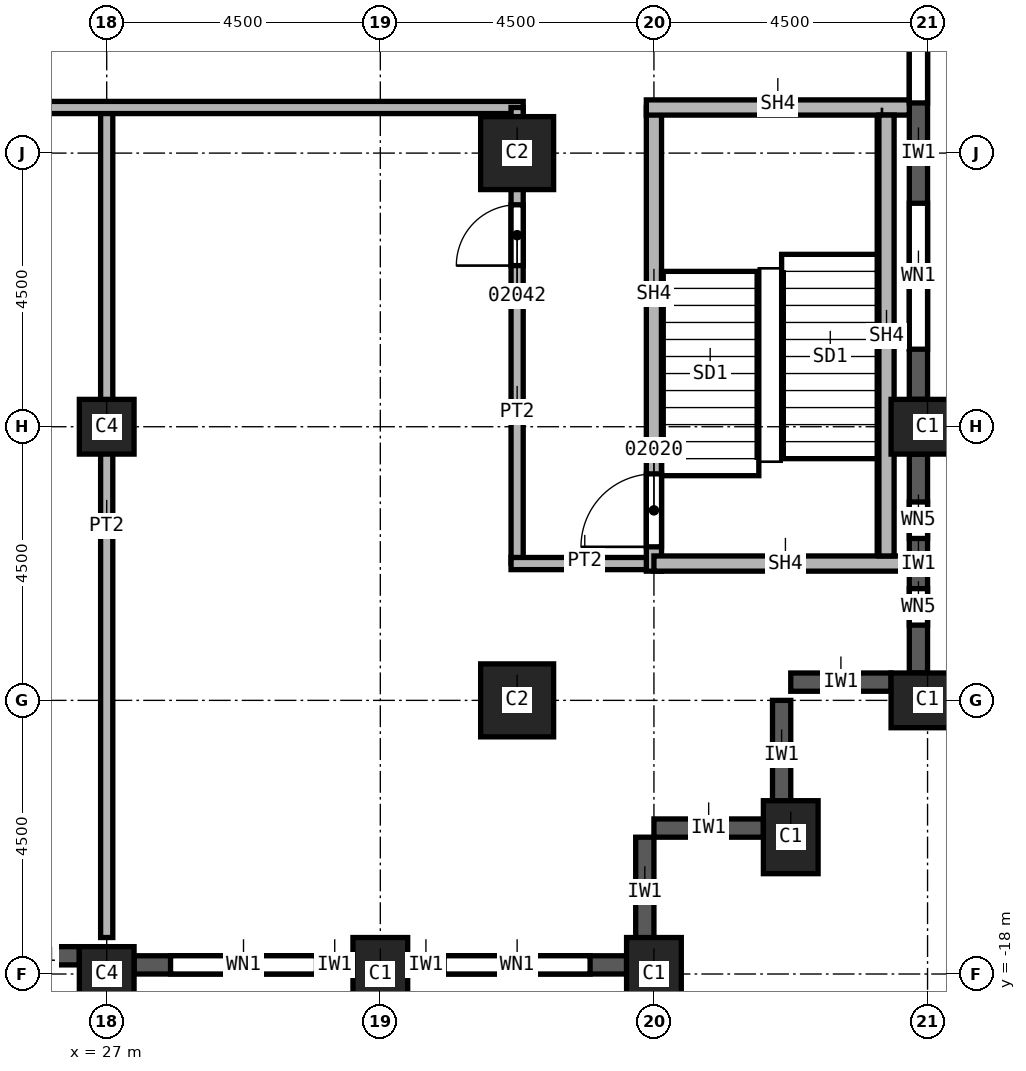
"""IFC4 building model, lengths in metres.
Left out: names, types, materials, properties, quantities, classifications, styles, units other than length and angle.
Written with IfcOpenShell. Run it as: python <this file> out.ifc"""

import sys

from ifc_helpers import new_model, si_unit, direction, frame, frame_2d, origin, origin_2d, place, context, subcontext, project, spatial, rectangle, extrude, element, fill, save


model = new_model("IFC4")
c1 = context("Model", 3, precision=1e-05, world=origin(), true_north=direction((0.0, 1.0)))
c2 = subcontext(c1, "Body", "Model", "MODEL_VIEW")
j1 = project(units=[si_unit("LENGTHUNIT", "METRE"), si_unit("PLANEANGLEUNIT", "RADIAN")], contexts=[c1])
p1 = place(None, origin())
s1 = spatial("IfcSite", under=j1, at=p1, CompositionType="ELEMENT")
p2 = place(p1, origin())
s2 = spatial("IfcBuilding", under=s1, at=p2, CompositionType="ELEMENT")
p3 = place(p2, frame((0.0, 0.0, 80.0)))
s3 = spatial("IfcBuildingStorey", under=s2, at=p3, CompositionType="ELEMENT", Elevation=80.0)
for number, where, z_axis, x_axis in (
    (1, (40.5, -9.0, 0.0), (0.0, 0.0, 1.0), (0.0, 1.0, 0.0)),
    (2, (40.5, -13.5, 0.0), (0.0, 0.0, 1.0), (0.0, 1.0, 0.0)),
    (3, (38.25, -15.75, 0.0), (0.0, 0.0, 1.0), (1.0, 0.0, 0.0)),
    (4, (31.5, -18.0, 0.0), (0.0, 0.0, 1.0), (1.0, 0.0, 0.0)),
    (5, (36.0, -18.0, 0.0), (0.0, 0.0, 1.0), (1.0, 0.0, 0.0)),
):
    element("IfcColumn", number, at=place(p3, frame(where, z_axis=z_axis, x_axis=x_axis)), inside=s3, PredefinedType="COLUMN", context=c2, shape_type="SweptSolid", body=[
        extrude(rectangle(XDim=0.9, YDim=1.2, at=origin_2d()), origin(), (0.0, 0.0, 1.0), 3.7),
    ])
for number, where, z_axis, x_axis in (
    (6, (33.75, -4.5, 0.0), (0.0, 0.0, 1.0), (1.0, 0.0, 0.0)),
    (7, (33.75, -13.5, 0.0), (0.0, 0.0, 1.0), (1.0, 0.0, 0.0)),
):
    element("IfcColumn", number, at=place(p3, frame(where, z_axis=z_axis, x_axis=x_axis)), inside=s3, PredefinedType="COLUMN", context=c2, shape_type="SweptSolid", body=[
        extrude(rectangle(XDim=1.2, YDim=1.2, at=origin_2d()), origin(), (0.0, 0.0, 1.0), 3.7),
    ])
for number, where, z_axis, x_axis in (
    (8, (27.0, -9.0, 0.0), (0.0, 0.0, 1.0), (1.0, 0.0, 0.0)),
    (9, (27.0, -18.0, 0.0), (0.0, 0.0, 1.0), (1.0, 0.0, 0.0)),
):
    element("IfcColumn", number, at=place(p3, frame(where, z_axis=z_axis, x_axis=x_axis)), inside=s3, PredefinedType="COLUMN", context=c2, shape_type="SweptSolid", body=[
        extrude(rectangle(XDim=0.9, YDim=0.9, at=origin_2d()), origin(), (0.0, 0.0, 1.0), 3.7),
    ])
for number, where, z_axis, x_axis in (
    (10, (35.85, -17.55, 0.0), (0.0, 0.0, 1.0), (0.0, 1.0, 0.0)),
    (11, (37.8, -15.6, 0.0), (0.0, 0.0, 1.0), (-1.0, 0.0, 0.0)),
    (12, (38.1, -15.3, 0.0), (0.0, 0.0, 1.0), (0.0, 1.0, 0.0)),
):
    element("IfcWall", number, at=place(p3, frame(where, z_axis=z_axis, x_axis=x_axis)), inside=s3, PredefinedType="SOLIDWALL", context=c2, shape_type="SweptSolid", body=[
        extrude(rectangle(XDim=1.8, YDim=0.3, at=frame_2d((0.9, 0.0))), origin(), (0.0, 0.0, 1.0), 3.1),
    ])
p4 = place(p3, frame((39.9, -13.2, 0.0), z_axis=(0.0, 0.0, 1.0), x_axis=(-1.0, 0.0, 0.0)))
e13 = element("IfcWall", 13, at=p4, inside=s3, PredefinedType="SOLIDWALL", context=c2, shape_type="SweptSolid", body=[
    extrude(rectangle(XDim=1.65, YDim=0.3, at=frame_2d((0.825, 0.0))), origin(), (0.0, 0.0, 1.0), 3.1),
])
p5 = place(p3, frame((25.2, -17.7, 0.0), z_axis=(0.0, 0.0, 1.0), x_axis=(1.0, 0.0, 0.0)))
e14 = element("IfcWall", 14, at=p5, inside=s3, PredefinedType="SOLIDWALL", context=c2, shape_type="SweptSolid", body=[
    extrude(rectangle(XDim=1.35, YDim=0.3, at=frame_2d((0.675, 0.0))), origin(), (0.0, 0.0, 1.0), 3.1),
])
p6 = place(p3, frame((27.45, -17.85, 0.0), z_axis=(0.0, 0.0, 1.0), x_axis=(1.0, 0.0, 0.0)))
e15 = element("IfcWall", 15, at=p6, inside=s3, PredefinedType="SOLIDWALL", context=c2, shape_type="SweptSolid", body=[
    extrude(rectangle(XDim=3.6, YDim=0.3, at=frame_2d((1.8, 0.0))), origin(), (0.0, 0.0, 1.0), 3.1),
])
p7 = place(p6, frame((0.6, 0.0, 0.8)))
e16 = element("IfcOpeningElement", 16, at=p7, cuts=e15, PredefinedType="OPENING", context=c2, shape_type="SweptSolid", body=[
    extrude(rectangle(XDim=2.4, YDim=1.95, at=frame_2d((1.2, 0.975))), frame((0.0, 0.15, 0.0), z_axis=(0.0, -1.0, 0.0), x_axis=(1.0, 0.0, 0.0)), (0.0, 0.0, 1.0), 0.3),
])
p8 = place(p3, frame((31.95, -17.85, 0.0), z_axis=(0.0, 0.0, 1.0), x_axis=(1.0, 0.0, 0.0)))
e17 = element("IfcWall", 17, at=p8, inside=s3, PredefinedType="SOLIDWALL", context=c2, shape_type="SweptSolid", body=[
    extrude(rectangle(XDim=3.6, YDim=0.3, at=frame_2d((1.8, 0.0))), origin(), (0.0, 0.0, 1.0), 3.1),
])
p9 = place(p8, frame((0.6, 0.0, 0.8)))
e18 = element("IfcOpeningElement", 18, at=p9, cuts=e17, PredefinedType="OPENING", context=c2, shape_type="SweptSolid", body=[
    extrude(rectangle(XDim=2.4, YDim=1.95, at=frame_2d((1.2, 0.975))), frame((0.0, 0.15, 0.0), z_axis=(0.0, -1.0, 0.0), x_axis=(1.0, 0.0, 0.0)), (0.0, 0.0, 1.0), 0.3),
])
p10 = place(p3, frame((40.35, -13.05, 0.0), z_axis=(0.0, 0.0, 1.0), x_axis=(0.0, 1.0, 0.0)))
e19 = element("IfcWall", 19, at=p10, inside=s3, PredefinedType="SOLIDWALL", context=c2, shape_type="SweptSolid", body=[
    extrude(rectangle(XDim=3.6, YDim=0.3, at=frame_2d((1.8, 0.0))), origin(), (0.0, 0.0, 1.0), 3.1),
])
p11 = place(p10, frame((0.788, 0.0, 0.8)))
e20 = element("IfcOpeningElement", 20, at=p11, cuts=e19, PredefinedType="OPENING", context=c2, shape_type="SweptSolid", body=[
    extrude(rectangle(XDim=0.6, YDim=1.95, at=frame_2d((0.3, 0.975))), frame((0.0, 0.15, 0.0), z_axis=(0.0, -1.0, 0.0), x_axis=(1.0, 0.0, 0.0)), (0.0, 0.0, 1.0), 0.3),
])
p12 = place(p10, frame((2.212, 0.0, 0.8)))
e21 = element("IfcOpeningElement", 21, at=p12, cuts=e19, PredefinedType="OPENING", context=c2, shape_type="SweptSolid", body=[
    extrude(rectangle(XDim=0.6, YDim=1.95, at=frame_2d((0.3, 0.975))), frame((0.0, 0.15, 0.0), z_axis=(0.0, -1.0, 0.0), x_axis=(1.0, 0.0, 0.0)), (0.0, 0.0, 1.0), 0.3),
])
p13 = place(p3, frame((40.35, -8.55, 0.0), z_axis=(0.0, 0.0, 1.0), x_axis=(0.0, 1.0, 0.0)))
e22 = element("IfcWall", 22, at=p13, inside=s3, PredefinedType="SOLIDWALL", context=c2, shape_type="SweptSolid", body=[
    extrude(rectangle(XDim=8.1, YDim=0.3, at=frame_2d((4.05, 0.0))), origin(), (0.0, 0.0, 1.0), 3.1),
])
p14 = place(p13, frame((0.825, 0.0, 0.8)))
e23 = element("IfcOpeningElement", 23, at=p14, cuts=e22, PredefinedType="OPENING", context=c2, shape_type="SweptSolid", body=[
    extrude(rectangle(XDim=2.4, YDim=1.95, at=frame_2d((1.2, 0.975))), frame((0.0, 0.15, 0.0), z_axis=(0.0, -1.0, 0.0), x_axis=(1.0, 0.0, 0.0)), (0.0, 0.0, 1.0), 0.3),
])
p15 = place(p13, frame((4.875, 0.0, 0.8)))
e24 = element("IfcOpeningElement", 24, at=p15, cuts=e22, PredefinedType="OPENING", context=c2, shape_type="SweptSolid", body=[
    extrude(rectangle(XDim=2.4, YDim=1.95, at=frame_2d((1.2, 0.975))), frame((0.0, 0.15, 0.0), z_axis=(0.0, -1.0, 0.0), x_axis=(1.0, 0.0, 0.0)), (0.0, 0.0, 1.0), 0.3),
])
p16 = place(p3, frame((27.0, -3.75, 0.0), z_axis=(0.0, 0.0, 1.0), x_axis=(0.0, -1.0, 0.0)))
e25 = element("IfcWall", 25, at=p16, inside=s3, PredefinedType="PARTITIONING", context=c2, shape_type="SweptSolid", body=[
    extrude(rectangle(XDim=13.65, YDim=0.2, at=frame_2d((6.825, 0.0))), origin(), (0.0, 0.0, 1.0), 3.7),
])
p17 = place(p3, frame((33.85, -3.75, 0.0), z_axis=(0.0, 0.0, 1.0), x_axis=(-1.0, 0.0, 0.0)))
e26 = element("IfcWall", 26, at=p17, inside=s3, PredefinedType="PARTITIONING", context=c2, shape_type="SweptSolid", body=[
    extrude(rectangle(XDim=18.45, YDim=0.2, at=frame_2d((9.225, 0.0))), origin(), (0.0, 0.0, 1.0), 3.7),
])
p18 = place(p3, frame((33.75, -11.25, 0.0), z_axis=(0.0, 0.0, 1.0), x_axis=(0.0, 1.0, 0.0)))
e27 = element("IfcWall", 27, at=p18, inside=s3, PredefinedType="PARTITIONING", context=c2, shape_type="SweptSolid", body=[
    extrude(rectangle(XDim=7.5, YDim=0.2, at=frame_2d((3.75, 0.0))), origin(), (0.0, 0.0, 1.0), 3.7),
])
p19 = place(p18, frame((4.9, 0.0, 0.0)))
e28 = element("IfcOpeningElement", 28, at=p19, cuts=e27, PredefinedType="OPENING", context=c2, shape_type="SweptSolid", body=[
    extrude(rectangle(XDim=1.0, YDim=2.1, at=frame_2d((0.5, 1.05))), frame((0.0, 0.1, 0.0), z_axis=(0.0, -1.0, 0.0), x_axis=(1.0, 0.0, 0.0)), (0.0, 0.0, 1.0), 0.2),
])
p20 = place(p3, frame((36.0, -11.25, 0.0), z_axis=(0.0, 0.0, 1.0), x_axis=(-1.0, 0.0, 0.0)))
e29 = element("IfcWall", 29, at=p20, inside=s3, PredefinedType="PARTITIONING", context=c2, shape_type="SweptSolid", body=[
    extrude(rectangle(XDim=2.35, YDim=0.2, at=frame_2d((1.175, 0.0))), origin(), (0.0, 0.0, 1.0), 3.7),
])
p21 = place(p3, frame((36.0, -11.375, 0.0), z_axis=(0.0, 0.0, 1.0), x_axis=(0.0, 1.0, 0.0)))
e30 = element("IfcWall", 30, at=p21, inside=s3, PredefinedType="SOLIDWALL", context=c2, shape_type="SweptSolid", body=[
    extrude(rectangle(XDim=7.625, YDim=0.25, at=frame_2d((3.812, 0.0))), origin(), (0.0, 0.0, 1.0), 3.7),
])
p22 = place(p21, frame((0.4, 0.0, 0.0)))
e31 = element("IfcOpeningElement", 31, at=p22, cuts=e30, PredefinedType="OPENING", context=c2, shape_type="SweptSolid", body=[
    extrude(rectangle(XDim=1.2, YDim=2.1, at=frame_2d((0.6, 1.05))), frame((0.0, 0.125, 0.0), z_axis=(0.0, -1.0, 0.0), x_axis=(1.0, 0.0, 0.0)), (0.0, 0.0, 1.0), 0.25),
])
p23 = place(p3, frame((40.2, -11.25, 0.0), z_axis=(0.0, 0.0, 1.0), x_axis=(-1.0, 0.0, 0.0)))
e32 = element("IfcWall", 32, at=p23, inside=s3, PredefinedType="SOLIDWALL", context=c2, shape_type="SweptSolid", body=[
    extrude(rectangle(XDim=4.2, YDim=0.25, at=frame_2d((2.1, 0.0))), origin(), (0.0, 0.0, 1.0), 3.7),
])
p24 = place(p3, frame((40.2, -3.75, 0.0), z_axis=(0.0, 0.0, 1.0), x_axis=(-1.0, 0.0, 0.0)))
e33 = element("IfcWall", 33, at=p24, inside=s3, PredefinedType="SOLIDWALL", context=c2, shape_type="SweptSolid", body=[
    extrude(rectangle(XDim=4.325, YDim=0.25, at=frame_2d((2.163, 0.0))), origin(), (0.0, 0.0, 1.0), 3.7),
])
p25 = place(p3, frame((39.825, -11.125, 0.0), z_axis=(0.0, 0.0, 1.0), x_axis=(0.0, 1.0, 0.0)))
e34 = element("IfcWall", 34, at=p25, inside=s3, PredefinedType="SOLIDWALL", context=c2, shape_type="SweptSolid", body=[
    extrude(rectangle(XDim=7.25, YDim=0.25, at=frame_2d((3.625, 0.0))), origin(), (0.0, 0.0, 1.0), 3.7),
])
p26 = place(p7, origin())
e35 = element("IfcWindow", 35, at=p26, inside=s3, PartitioningType="SINGLE_PANEL", PredefinedType="WINDOW", context=c2, shape_type="SweptSolid", body=[
    extrude(rectangle(XDim=2.4, YDim=1.95, at=frame_2d((1.2, 0.975))), frame((0.0, 0.03, 0.0), z_axis=(0.0, -1.0, 0.0), x_axis=(1.0, 0.0, 0.0)), (0.0, 0.0, 1.0), 0.06),
])
fill(e16, e35)
p27 = place(p9, origin())
e36 = element("IfcWindow", 36, at=p27, inside=s3, PartitioningType="SINGLE_PANEL", PredefinedType="WINDOW", context=c2, shape_type="SweptSolid", body=[
    extrude(rectangle(XDim=2.4, YDim=1.95, at=frame_2d((1.2, 0.975))), frame((0.0, 0.03, 0.0), z_axis=(0.0, -1.0, 0.0), x_axis=(1.0, 0.0, 0.0)), (0.0, 0.0, 1.0), 0.06),
])
fill(e18, e36)
p28 = place(p14, origin())
e37 = element("IfcWindow", 37, at=p28, inside=s3, PartitioningType="SINGLE_PANEL", PredefinedType="WINDOW", context=c2, shape_type="SweptSolid", body=[
    extrude(rectangle(XDim=2.4, YDim=1.95, at=frame_2d((1.2, 0.975))), frame((0.0, 0.03, 0.0), z_axis=(0.0, -1.0, 0.0), x_axis=(1.0, 0.0, 0.0)), (0.0, 0.0, 1.0), 0.06),
])
fill(e23, e37)
p29 = place(p15, origin())
e38 = element("IfcWindow", 38, at=p29, inside=s3, PartitioningType="SINGLE_PANEL", PredefinedType="WINDOW", context=c2, shape_type="SweptSolid", body=[
    extrude(rectangle(XDim=2.4, YDim=1.95, at=frame_2d((1.2, 0.975))), frame((0.0, 0.03, 0.0), z_axis=(0.0, -1.0, 0.0), x_axis=(1.0, 0.0, 0.0)), (0.0, 0.0, 1.0), 0.06),
])
fill(e24, e38)
p30 = place(p22, origin())
e39 = element("IfcDoor", 39, at=p30, inside=s3, OperationType="SINGLE_SWING_LEFT", PredefinedType="DOOR", context=c2, shape_type="SweptSolid", body=[
    extrude(rectangle(XDim=1.2, YDim=2.1, at=frame_2d((0.6, 1.05))), frame((0.0, 0.025, 0.0), z_axis=(0.0, -1.0, 0.0), x_axis=(1.0, 0.0, 0.0)), (0.0, 0.0, 1.0), 0.05),
])
fill(e31, e39)
p31 = place(p19, origin())
e40 = element("IfcDoor", 40, at=p31, inside=s3, OperationType="SINGLE_SWING_LEFT", PredefinedType="DOOR", context=c2, shape_type="SweptSolid", body=[
    extrude(rectangle(XDim=1.0, YDim=2.1, at=frame_2d((0.5, 1.05))), frame((0.0, 0.025, 0.0), z_axis=(0.0, -1.0, 0.0), x_axis=(1.0, 0.0, 0.0)), (0.0, 0.0, 1.0), 0.05),
])
fill(e28, e40)
p32 = place(p11, origin())
e41 = element("IfcWindow", 41, at=p32, inside=s3, PartitioningType="SINGLE_PANEL", PredefinedType="WINDOW", context=c2, shape_type="SweptSolid", body=[
    extrude(rectangle(XDim=0.6, YDim=1.95, at=frame_2d((0.3, 0.975))), frame((0.0, 0.03, 0.0), z_axis=(0.0, -1.0, 0.0), x_axis=(1.0, 0.0, 0.0)), (0.0, 0.0, 1.0), 0.06),
])
fill(e20, e41)
p33 = place(p12, origin())
e42 = element("IfcWindow", 42, at=p33, inside=s3, PartitioningType="SINGLE_PANEL", PredefinedType="WINDOW", context=c2, shape_type="SweptSolid", body=[
    extrude(rectangle(XDim=0.6, YDim=1.95, at=frame_2d((0.3, 0.975))), frame((0.0, 0.03, 0.0), z_axis=(0.0, -1.0, 0.0), x_axis=(1.0, 0.0, 0.0)), (0.0, 0.0, 1.0), 0.06),
])
fill(e21, e42)
save(model, sys.argv[1])
